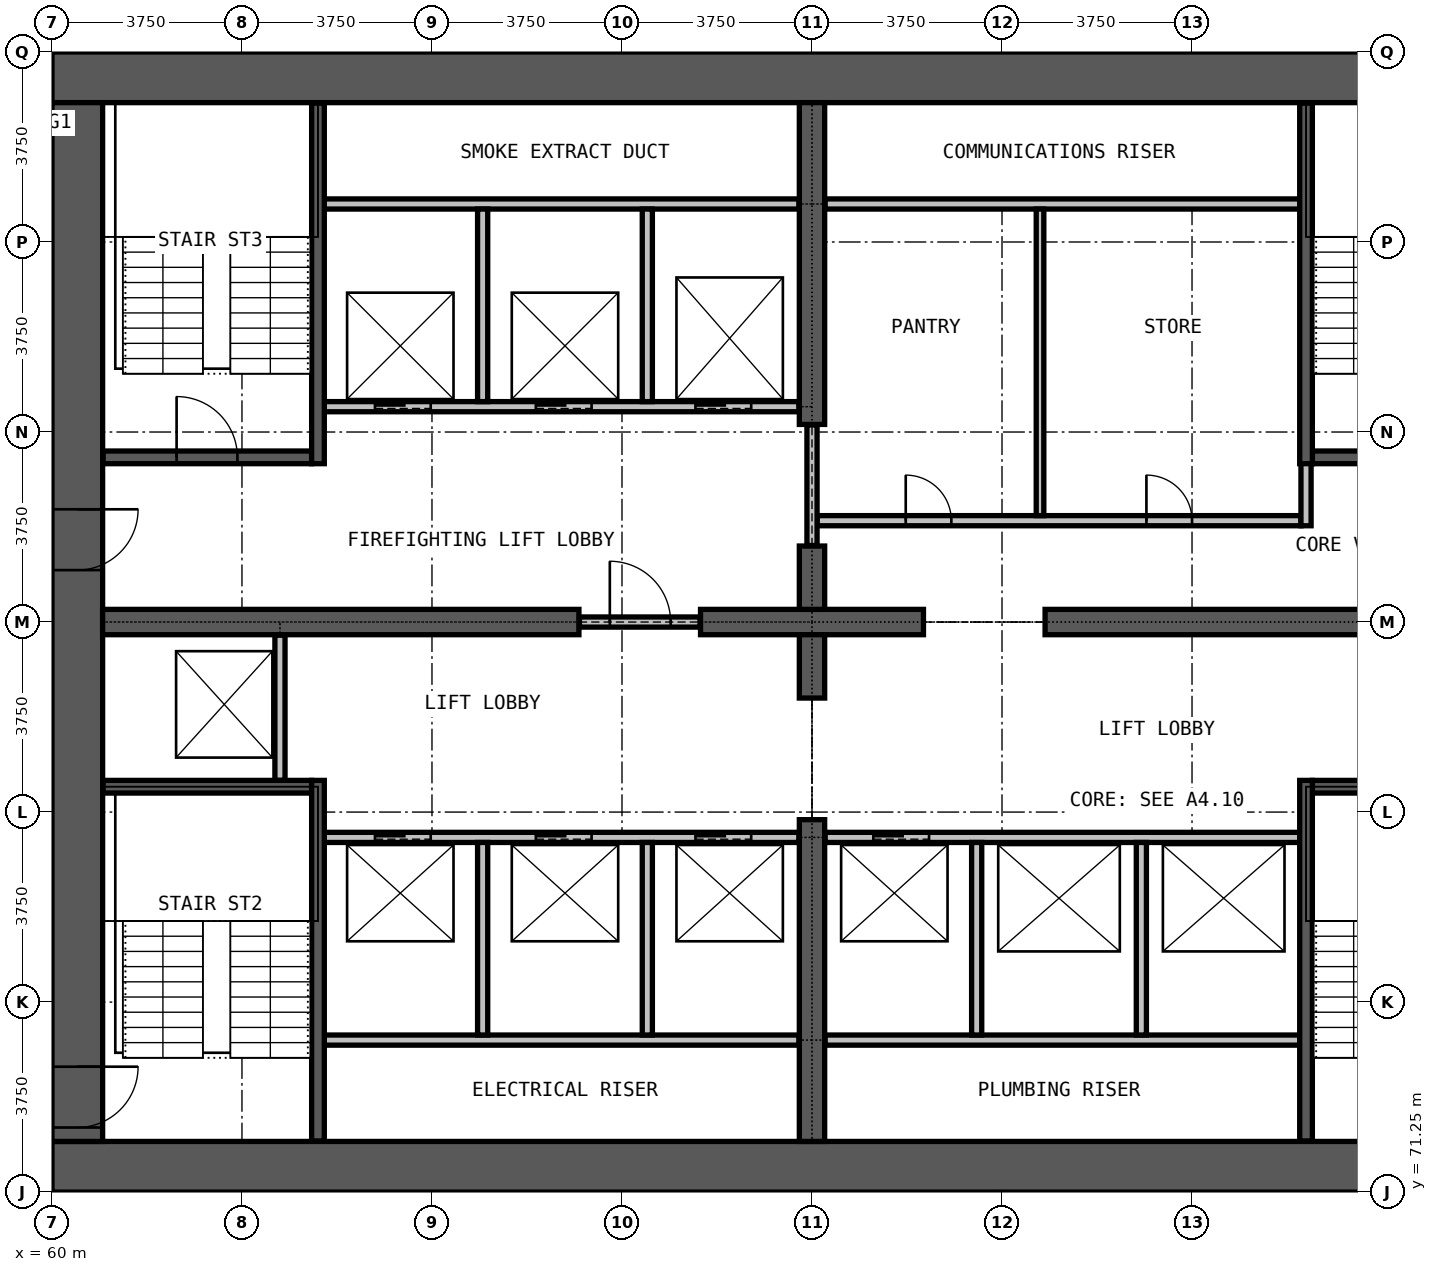
"""IFC4 building model, lengths in metres.
Left out: names, types, materials, properties, quantities, classifications, styles, units other than length and angle.
Written with IfcOpenShell. Run it as: python <this file> out.ifc"""

import sys

from ifc_helpers import new_model, si_unit, direction, frame, frame_2d, origin, place, context, subcontext, project, spatial, rectangle, extrude, element, fill, save


model = new_model("IFC4")
c1 = context("Model", 3, precision=1e-05, world=origin(), true_north=direction((0.0, 1.0)))
c2 = subcontext(c1, "Body", "Model", "MODEL_VIEW")
j1 = project(units=[si_unit("LENGTHUNIT", "METRE"), si_unit("PLANEANGLEUNIT", "RADIAN")], contexts=[c1])
p1 = place(None, origin())
s1 = spatial("IfcSite", under=j1, at=p1, CompositionType="ELEMENT")
p2 = place(p1, origin())
s2 = spatial("IfcBuilding", under=s1, at=p2, CompositionType="ELEMENT")
p3 = place(p2, frame((0.0, 0.0, 98.9)))
s3 = spatial("IfcBuildingStorey", under=s2, at=p3, CompositionType="ELEMENT", Elevation=98.9)
for number, where, z_axis, x_axis in (
    (1, (60.0, 71.75, 0.0), (0.0, 0.0, 1.0), (1.0, 0.0, 0.0)),
    (2, (90.0, 93.25, 0.0), (0.0, 0.0, 1.0), (-1.0, 0.0, 0.0)),
):
    element("IfcWall", number, at=place(p3, frame(where, z_axis=z_axis, x_axis=x_axis)), inside=s3, PredefinedType="SHEAR", context=c2, shape_type="SweptSolid", body=[
        extrude(rectangle(XDim=30.0, YDim=1.0, at=frame_2d((15.0, 0.0))), origin(), (0.0, 0.0, 1.0), 3.3),
    ])
p4 = place(p3, frame((60.5, 92.75, 0.0), z_axis=(0.0, 0.0, 1.0), x_axis=(0.0, -1.0, 0.0)))
e3 = element("IfcWall", 3, at=p4, inside=s3, PredefinedType="SHEAR", context=c2, shape_type="SweptSolid", body=[
    extrude(rectangle(XDim=20.5, YDim=1.0, at=frame_2d((10.25, 0.0))), origin(), (0.0, 0.0, 1.0), 3.3),
])
p5 = place(p4, frame((19.025, 0.0, 0.0)))
e4 = element("IfcOpeningElement", 4, at=p5, cuts=e3, PredefinedType="OPENING", context=c2, shape_type="SweptSolid", body=[
    extrude(rectangle(XDim=1.2, YDim=2.2, at=frame_2d((0.6, 1.1))), frame((0.0, 0.51, 0.0), z_axis=(0.0, -1.0, 0.0), x_axis=(1.0, 0.0, 0.0)), (0.0, 0.0, 1.0), 1.02),
])
p6 = place(p4, frame((8.025, 0.0, 0.0)))
e5 = element("IfcOpeningElement", 5, at=p6, cuts=e3, PredefinedType="OPENING", context=c2, shape_type="SweptSolid", body=[
    extrude(rectangle(XDim=1.2, YDim=2.2, at=frame_2d((0.6, 1.1))), frame((0.0, 0.51, 0.0), z_axis=(0.0, -1.0, 0.0), x_axis=(1.0, 0.0, 0.0)), (0.0, 0.0, 1.0), 1.02),
])
p7 = place(p3, frame((61.0, 82.5, 0.0), z_axis=(0.0, 0.0, 1.0), x_axis=(1.0, 0.0, 0.0)))
e6 = element("IfcWall", 6, at=p7, inside=s3, PredefinedType="SHEAR", context=c2, shape_type="SweptSolid", body=[
    extrude(rectangle(XDim=9.4, YDim=0.5, at=frame_2d((4.7, 0.0))), origin(), (0.0, 0.0, 1.0), 3.3),
])
p8 = place(p3, frame((72.8, 82.5, 0.0), z_axis=(0.0, 0.0, 1.0), x_axis=(1.0, 0.0, 0.0)))
e7 = element("IfcWall", 7, at=p8, inside=s3, PredefinedType="SHEAR", context=c2, shape_type="SweptSolid", body=[
    extrude(rectangle(XDim=4.4, YDim=0.5, at=frame_2d((2.2, 0.0))), origin(), (0.0, 0.0, 1.0), 3.3),
])
p9 = place(p3, frame((79.6, 82.5, 0.0), z_axis=(0.0, 0.0, 1.0), x_axis=(1.0, 0.0, 0.0)))
e8 = element("IfcWall", 8, at=p9, inside=s3, PredefinedType="SHEAR", context=c2, shape_type="SweptSolid", body=[
    extrude(rectangle(XDim=9.4, YDim=0.5, at=frame_2d((4.7, 0.0))), origin(), (0.0, 0.0, 1.0), 3.3),
])
p10 = place(p3, frame((75.0, 72.25, 0.0), z_axis=(0.0, 0.0, 1.0), x_axis=(0.0, 1.0, 0.0)))
e9 = element("IfcWall", 9, at=p10, inside=s3, PredefinedType="SHEAR", context=c2, shape_type="SweptSolid", body=[
    extrude(rectangle(XDim=6.35, YDim=0.5, at=frame_2d((3.175, 0.0))), origin(), (0.0, 0.0, 1.0), 3.3),
])
for number, where, z_axis, x_axis in (
    (10, (75.0, 81.0, 0.0), (0.0, 0.0, 1.0), (0.0, 1.0, 0.0)),
    (11, (75.0, 82.75, 0.0), (0.0, 0.0, 1.0), (0.0, 1.0, 0.0)),
):
    element("IfcWall", number, at=place(p3, frame(where, z_axis=z_axis, x_axis=x_axis)), inside=s3, PredefinedType="SHEAR", context=c2, shape_type="SweptSolid", body=[
        extrude(rectangle(XDim=1.25, YDim=0.5, at=frame_2d((0.625, 0.0))), origin(), (0.0, 0.0, 1.0), 3.3),
    ])
p11 = place(p3, frame((75.0, 86.4, 0.0), z_axis=(0.0, 0.0, 1.0), x_axis=(0.0, 1.0, 0.0)))
e12 = element("IfcWall", 12, at=p11, inside=s3, PredefinedType="SHEAR", context=c2, shape_type="SweptSolid", body=[
    extrude(rectangle(XDim=6.35, YDim=0.5, at=frame_2d((3.175, 0.0))), origin(), (0.0, 0.0, 1.0), 3.3),
])
p12 = place(p3, frame((70.41, 82.5, 0.0), z_axis=(0.0, 0.0, 1.0), x_axis=(1.0, 0.0, 0.0)))
e13 = element("IfcWall", 13, at=p12, inside=s3, PredefinedType="PARTITIONING", context=c2, shape_type="SweptSolid", body=[
    extrude(rectangle(XDim=2.38, YDim=0.2, at=frame_2d((1.19, 0.0))), origin(), (0.0, 0.0, 1.0), 2.4),
])
p13 = place(p12, frame((0.6, 0.0, 0.0)))
e14 = element("IfcOpeningElement", 14, at=p13, cuts=e13, PredefinedType="OPENING", context=c2, shape_type="SweptSolid", body=[
    extrude(rectangle(XDim=1.2, YDim=2.2, at=frame_2d((0.6, 1.1))), frame((0.0, 0.11, 0.0), z_axis=(0.0, -1.0, 0.0), x_axis=(1.0, 0.0, 0.0)), (0.0, 0.0, 1.0), 0.22),
])
p14 = place(p3, frame((75.1, 84.5, 0.0), z_axis=(0.0, 0.0, 1.0), x_axis=(1.0, 0.0, 0.0)))
e15 = element("IfcWall", 15, at=p14, inside=s3, PredefinedType="PARTITIONING", context=c2, shape_type="SweptSolid", body=[
    extrude(rectangle(XDim=9.55, YDim=0.2, at=frame_2d((4.775, 0.0))), origin(), (0.0, 0.0, 1.0), 2.95),
])
p15 = place(p14, frame((1.75, 0.0, 0.0)))
e16 = element("IfcOpeningElement", 16, at=p15, cuts=e15, PredefinedType="OPENING", context=c2, shape_type="SweptSolid", body=[
    extrude(rectangle(XDim=0.9, YDim=2.2, at=frame_2d((0.45, 1.1))), frame((0.0, 0.11, 0.0), z_axis=(0.0, -1.0, 0.0), x_axis=(1.0, 0.0, 0.0)), (0.0, 0.0, 1.0), 0.22),
])
p16 = place(p14, frame((6.5, 0.0, 0.0)))
e17 = element("IfcOpeningElement", 17, at=p16, cuts=e15, PredefinedType="OPENING", context=c2, shape_type="SweptSolid", body=[
    extrude(rectangle(XDim=0.9, YDim=2.2, at=frame_2d((0.45, 1.1))), frame((0.0, 0.11, 0.0), z_axis=(0.0, -1.0, 0.0), x_axis=(1.0, 0.0, 0.0)), (0.0, 0.0, 1.0), 0.22),
])
p17 = place(p3, frame((75.26, 90.75, 0.0), z_axis=(0.0, 0.0, 1.0), x_axis=(1.0, 0.0, 0.0)))
e18 = element("IfcWall", 18, at=p17, inside=s3, PredefinedType="PARTITIONING", context=c2, shape_type="SweptSolid", body=[
    extrude(rectangle(XDim=9.365, YDim=0.2, at=frame_2d((4.683, 0.0))), origin(), (0.0, 0.0, 1.0), 2.95),
])
p18 = place(p3, frame((75.0, 84.01, 0.0), z_axis=(0.0, 0.0, 1.0), x_axis=(0.0, 1.0, 0.0)))
e19 = element("IfcWall", 19, at=p18, inside=s3, PredefinedType="PARTITIONING", context=c2, shape_type="SweptSolid", body=[
    extrude(rectangle(XDim=2.38, YDim=0.2, at=frame_2d((1.19, 0.0))), origin(), (0.0, 0.0, 1.0), 2.4),
])
p19 = place(p3, frame((84.75, 84.4, 0.0), z_axis=(0.0, 0.0, 1.0), x_axis=(0.0, 1.0, 0.0)))
e20 = element("IfcWall", 20, at=p19, inside=s3, PredefinedType="PARTITIONING", context=c2, shape_type="SweptSolid", body=[
    extrude(rectangle(XDim=1.475, YDim=0.2, at=frame_2d((0.738, 0.0))), origin(), (0.0, 0.0, 1.0), 2.95),
])
p20 = place(p3, frame((79.5, 84.6, 0.0), z_axis=(0.0, 0.0, 1.0), x_axis=(0.0, 1.0, 0.0)))
e21 = element("IfcWall", 21, at=p20, inside=s3, PredefinedType="PARTITIONING", context=c2, shape_type="SweptSolid", body=[
    extrude(rectangle(XDim=6.05, YDim=0.15, at=frame_2d((3.025, 0.0))), origin(), (0.0, 0.0, 1.0), 2.95),
])
for number, where, z_axis, x_axis in (
    (22, (65.375, 74.25, 0.0), (0.0, 0.0, 1.0), (1.0, 0.0, 0.0)),
    (23, (75.26, 74.25, 0.0), (0.0, 0.0, 1.0), (1.0, 0.0, 0.0)),
):
    element("IfcWall", number, at=place(p3, frame(where, z_axis=z_axis, x_axis=x_axis)), inside=s3, PredefinedType="PARTITIONING", context=c2, shape_type="SweptSolid", body=[
        extrude(rectangle(XDim=9.365, YDim=0.2, at=frame_2d((4.683, 0.0))), origin(), (0.0, 0.0, 1.0), 2.95),
    ])
p21 = place(p3, frame((65.375, 78.25, 0.0), z_axis=(0.0, 0.0, 1.0), x_axis=(1.0, 0.0, 0.0)))
e24 = element("IfcWall", 24, at=p21, inside=s3, PredefinedType="PARTITIONING", context=c2, shape_type="SweptSolid", body=[
    extrude(rectangle(XDim=9.365, YDim=0.2, at=frame_2d((4.683, 0.0))), origin(), (0.0, 0.0, 1.0), 2.95),
])
p22 = place(p21, frame((1.0, 0.0, 0.0)))
e25 = element("IfcOpeningElement", 25, at=p22, cuts=e24, PredefinedType="OPENING", context=c2, shape_type="SweptSolid", body=[
    extrude(rectangle(XDim=1.1, YDim=2.2, at=frame_2d((0.55, 1.1))), frame((0.0, 0.11, 0.0), z_axis=(0.0, -1.0, 0.0), x_axis=(1.0, 0.0, 0.0)), (0.0, 0.0, 1.0), 0.22),
])
p23 = place(p21, frame((4.175, 0.0, 0.0)))
e26 = element("IfcOpeningElement", 26, at=p23, cuts=e24, PredefinedType="OPENING", context=c2, shape_type="SweptSolid", body=[
    extrude(rectangle(XDim=1.1, YDim=2.2, at=frame_2d((0.55, 1.1))), frame((0.0, 0.11, 0.0), z_axis=(0.0, -1.0, 0.0), x_axis=(1.0, 0.0, 0.0)), (0.0, 0.0, 1.0), 0.22),
])
p24 = place(p21, frame((7.325, 0.0, 0.0)))
e27 = element("IfcOpeningElement", 27, at=p24, cuts=e24, PredefinedType="OPENING", context=c2, shape_type="SweptSolid", body=[
    extrude(rectangle(XDim=1.1, YDim=2.2, at=frame_2d((0.55, 1.1))), frame((0.0, 0.11, 0.0), z_axis=(0.0, -1.0, 0.0), x_axis=(1.0, 0.0, 0.0)), (0.0, 0.0, 1.0), 0.22),
])
p25 = place(p3, frame((75.26, 78.25, 0.0), z_axis=(0.0, 0.0, 1.0), x_axis=(1.0, 0.0, 0.0)))
e28 = element("IfcWall", 28, at=p25, inside=s3, PredefinedType="PARTITIONING", context=c2, shape_type="SweptSolid", body=[
    extrude(rectangle(XDim=9.365, YDim=0.2, at=frame_2d((4.683, 0.0))), origin(), (0.0, 0.0, 1.0), 2.95),
])
p26 = place(p25, frame((0.95, 0.0, 0.0)))
e29 = element("IfcOpeningElement", 29, at=p26, cuts=e28, PredefinedType="OPENING", context=c2, shape_type="SweptSolid", body=[
    extrude(rectangle(XDim=1.1, YDim=2.2, at=frame_2d((0.55, 1.1))), frame((0.0, 0.11, 0.0), z_axis=(0.0, -1.0, 0.0), x_axis=(1.0, 0.0, 0.0)), (0.0, 0.0, 1.0), 0.22),
])
p27 = place(p3, frame((65.375, 86.75, 0.0), z_axis=(0.0, 0.0, 1.0), x_axis=(1.0, 0.0, 0.0)))
e30 = element("IfcWall", 30, at=p27, inside=s3, PredefinedType="PARTITIONING", context=c2, shape_type="SweptSolid", body=[
    extrude(rectangle(XDim=9.365, YDim=0.2, at=frame_2d((4.683, 0.0))), origin(), (0.0, 0.0, 1.0), 2.95),
])
p28 = place(p27, frame((1.0, 0.0, 0.0)))
e31 = element("IfcOpeningElement", 31, at=p28, cuts=e30, PredefinedType="OPENING", context=c2, shape_type="SweptSolid", body=[
    extrude(rectangle(XDim=1.1, YDim=2.2, at=frame_2d((0.55, 1.1))), frame((0.0, 0.11, 0.0), z_axis=(0.0, -1.0, 0.0), x_axis=(1.0, 0.0, 0.0)), (0.0, 0.0, 1.0), 0.22),
])
p29 = place(p27, frame((4.175, 0.0, 0.0)))
e32 = element("IfcOpeningElement", 32, at=p29, cuts=e30, PredefinedType="OPENING", context=c2, shape_type="SweptSolid", body=[
    extrude(rectangle(XDim=1.1, YDim=2.2, at=frame_2d((0.55, 1.1))), frame((0.0, 0.11, 0.0), z_axis=(0.0, -1.0, 0.0), x_axis=(1.0, 0.0, 0.0)), (0.0, 0.0, 1.0), 0.22),
])
p30 = place(p27, frame((7.325, 0.0, 0.0)))
e33 = element("IfcOpeningElement", 33, at=p30, cuts=e30, PredefinedType="OPENING", context=c2, shape_type="SweptSolid", body=[
    extrude(rectangle(XDim=1.1, YDim=2.2, at=frame_2d((0.55, 1.1))), frame((0.0, 0.11, 0.0), z_axis=(0.0, -1.0, 0.0), x_axis=(1.0, 0.0, 0.0)), (0.0, 0.0, 1.0), 0.22),
])
p31 = place(p3, frame((65.375, 90.75, 0.0), z_axis=(0.0, 0.0, 1.0), x_axis=(1.0, 0.0, 0.0)))
e34 = element("IfcWall", 34, at=p31, inside=s3, PredefinedType="PARTITIONING", context=c2, shape_type="SweptSolid", body=[
    extrude(rectangle(XDim=9.365, YDim=0.2, at=frame_2d((4.683, 0.0))), origin(), (0.0, 0.0, 1.0), 2.95),
])
p32 = place(p3, frame((64.5, 79.375, 0.0), z_axis=(0.0, 0.0, 1.0), x_axis=(0.0, 1.0, 0.0)))
e35 = element("IfcWall", 35, at=p32, inside=s3, PredefinedType="PARTITIONING", context=c2, shape_type="SweptSolid", body=[
    extrude(rectangle(XDim=2.865, YDim=0.2, at=frame_2d((1.433, 0.0))), origin(), (0.0, 0.0, 1.0), 2.95),
])
for number, where, z_axis, x_axis in (
    (36, (68.5, 74.35, 0.0), (0.0, 0.0, 1.0), (0.0, 1.0, 0.0)),
    (37, (68.5, 86.85, 0.0), (0.0, 0.0, 1.0), (0.0, 1.0, 0.0)),
    (38, (71.75, 74.35, 0.0), (0.0, 0.0, 1.0), (0.0, 1.0, 0.0)),
    (39, (71.75, 86.85, 0.0), (0.0, 0.0, 1.0), (0.0, 1.0, 0.0)),
    (40, (78.25, 74.35, 0.0), (0.0, 0.0, 1.0), (0.0, 1.0, 0.0)),
    (41, (81.5, 74.35, 0.0), (0.0, 0.0, 1.0), (0.0, 1.0, 0.0)),
):
    element("IfcWall", number, at=place(p3, frame(where, z_axis=z_axis, x_axis=x_axis)), inside=s3, PredefinedType="PARTITIONING", context=c2, shape_type="SweptSolid", body=[
        extrude(rectangle(XDim=3.8, YDim=0.2, at=frame_2d((1.9, 0.0))), origin(), (0.0, 0.0, 1.0), 2.95),
    ])
for number, where, z_axis, x_axis in (
    (42, (61.01, 79.25, 0.0), (0.0, 0.0, 1.0), (1.0, 0.0, 0.0)),
    (43, (84.875, 79.25, 0.0), (0.0, 0.0, 1.0), (1.0, 0.0, 0.0)),
):
    element("IfcWall", number, at=place(p3, frame(where, z_axis=z_axis, x_axis=x_axis)), inside=s3, PredefinedType="PARTITIONING", context=c2, shape_type="SweptSolid", body=[
        extrude(rectangle(XDim=4.115, YDim=0.25, at=frame_2d((2.058, 0.0))), origin(), (0.0, 0.0, 1.0), 2.95),
    ])
p33 = place(p3, frame((61.01, 85.75, 0.0), z_axis=(0.0, 0.0, 1.0), x_axis=(1.0, 0.0, 0.0)))
e44 = element("IfcWall", 44, at=p33, inside=s3, PredefinedType="PARTITIONING", context=c2, shape_type="SweptSolid", body=[
    extrude(rectangle(XDim=4.115, YDim=0.25, at=frame_2d((2.058, 0.0))), origin(), (0.0, 0.0, 1.0), 2.95),
])
p34 = place(p33, frame((1.45, 0.0, 0.0)))
e45 = element("IfcOpeningElement", 45, at=p34, cuts=e44, PredefinedType="OPENING", context=c2, shape_type="SweptSolid", body=[
    extrude(rectangle(XDim=1.2, YDim=2.2, at=frame_2d((0.6, 1.1))), frame((0.0, 0.135, 0.0), z_axis=(0.0, -1.0, 0.0), x_axis=(1.0, 0.0, 0.0)), (0.0, 0.0, 1.0), 0.27),
])
p35 = place(p3, frame((84.875, 85.75, 0.0), z_axis=(0.0, 0.0, 1.0), x_axis=(1.0, 0.0, 0.0)))
e46 = element("IfcWall", 46, at=p35, inside=s3, PredefinedType="PARTITIONING", context=c2, shape_type="SweptSolid", body=[
    extrude(rectangle(XDim=4.115, YDim=0.25, at=frame_2d((2.058, 0.0))), origin(), (0.0, 0.0, 1.0), 2.95),
])
for number, where, z_axis, x_axis in (
    (47, (65.25, 72.26, 0.0), (0.0, 0.0, 1.0), (0.0, 1.0, 0.0)),
    (48, (65.25, 85.625, 0.0), (0.0, 0.0, 1.0), (0.0, 1.0, 0.0)),
    (49, (84.75, 72.26, 0.0), (0.0, 0.0, 1.0), (0.0, 1.0, 0.0)),
    (50, (84.75, 85.625, 0.0), (0.0, 0.0, 1.0), (0.0, 1.0, 0.0)),
):
    element("IfcWall", number, at=place(p3, frame(where, z_axis=z_axis, x_axis=x_axis)), inside=s3, PredefinedType="PARTITIONING", context=c2, shape_type="SweptSolid", body=[
        extrude(rectangle(XDim=7.115, YDim=0.25, at=frame_2d((3.558, 0.0))), origin(), (0.0, 0.0, 1.0), 2.95),
    ])
p36 = place(p22, origin())
e51 = element("IfcDoor", 51, at=p36, inside=s3, OperationType="DOUBLE_DOOR_SLIDING", PredefinedType="DOOR", context=c2, shape_type="SweptSolid", body=[
    extrude(rectangle(XDim=1.1, YDim=2.2, at=frame_2d((0.55, 1.1))), frame((0.0, 0.025, 0.0), z_axis=(0.0, -1.0, 0.0), x_axis=(1.0, 0.0, 0.0)), (0.0, 0.0, 1.0), 0.05),
])
fill(e25, e51)
p37 = place(p23, origin())
e52 = element("IfcDoor", 52, at=p37, inside=s3, OperationType="DOUBLE_DOOR_SLIDING", PredefinedType="DOOR", context=c2, shape_type="SweptSolid", body=[
    extrude(rectangle(XDim=1.1, YDim=2.2, at=frame_2d((0.55, 1.1))), frame((0.0, 0.025, 0.0), z_axis=(0.0, -1.0, 0.0), x_axis=(1.0, 0.0, 0.0)), (0.0, 0.0, 1.0), 0.05),
])
fill(e26, e52)
p38 = place(p24, origin())
e53 = element("IfcDoor", 53, at=p38, inside=s3, OperationType="DOUBLE_DOOR_SLIDING", PredefinedType="DOOR", context=c2, shape_type="SweptSolid", body=[
    extrude(rectangle(XDim=1.1, YDim=2.2, at=frame_2d((0.55, 1.1))), frame((0.0, 0.025, 0.0), z_axis=(0.0, -1.0, 0.0), x_axis=(1.0, 0.0, 0.0)), (0.0, 0.0, 1.0), 0.05),
])
fill(e27, e53)
p39 = place(p26, origin())
e54 = element("IfcDoor", 54, at=p39, inside=s3, OperationType="DOUBLE_DOOR_SLIDING", PredefinedType="DOOR", context=c2, shape_type="SweptSolid", body=[
    extrude(rectangle(XDim=1.1, YDim=2.2, at=frame_2d((0.55, 1.1))), frame((0.0, 0.025, 0.0), z_axis=(0.0, -1.0, 0.0), x_axis=(1.0, 0.0, 0.0)), (0.0, 0.0, 1.0), 0.05),
])
fill(e29, e54)
p40 = place(p28, origin())
e55 = element("IfcDoor", 55, at=p40, inside=s3, OperationType="DOUBLE_DOOR_SLIDING", PredefinedType="DOOR", context=c2, shape_type="SweptSolid", body=[
    extrude(rectangle(XDim=1.1, YDim=2.2, at=frame_2d((0.55, 1.1))), frame((0.0, 0.025, 0.0), z_axis=(0.0, -1.0, 0.0), x_axis=(1.0, 0.0, 0.0)), (0.0, 0.0, 1.0), 0.05),
])
fill(e31, e55)
p41 = place(p29, origin())
e56 = element("IfcDoor", 56, at=p41, inside=s3, OperationType="DOUBLE_DOOR_SLIDING", PredefinedType="DOOR", context=c2, shape_type="SweptSolid", body=[
    extrude(rectangle(XDim=1.1, YDim=2.2, at=frame_2d((0.55, 1.1))), frame((0.0, 0.025, 0.0), z_axis=(0.0, -1.0, 0.0), x_axis=(1.0, 0.0, 0.0)), (0.0, 0.0, 1.0), 0.05),
])
fill(e32, e56)
p42 = place(p30, origin())
e57 = element("IfcDoor", 57, at=p42, inside=s3, OperationType="DOUBLE_DOOR_SLIDING", PredefinedType="DOOR", context=c2, shape_type="SweptSolid", body=[
    extrude(rectangle(XDim=1.1, YDim=2.2, at=frame_2d((0.55, 1.1))), frame((0.0, 0.025, 0.0), z_axis=(0.0, -1.0, 0.0), x_axis=(1.0, 0.0, 0.0)), (0.0, 0.0, 1.0), 0.05),
])
fill(e33, e57)
p43 = place(p13, origin())
e58 = element("IfcDoor", 58, at=p43, inside=s3, OperationType="SINGLE_SWING_RIGHT", PredefinedType="DOOR", context=c2, shape_type="SweptSolid", body=[
    extrude(rectangle(XDim=1.2, YDim=2.2, at=frame_2d((0.6, 1.1))), frame((0.0, 0.025, 0.0), z_axis=(0.0, -1.0, 0.0), x_axis=(1.0, 0.0, 0.0)), (0.0, 0.0, 1.0), 0.05),
])
fill(e14, e58)
p44 = place(p34, origin())
e59 = element("IfcDoor", 59, at=p44, inside=s3, OperationType="SINGLE_SWING_LEFT", PredefinedType="DOOR", context=c2, shape_type="SweptSolid", body=[
    extrude(rectangle(XDim=1.2, YDim=2.2, at=frame_2d((0.6, 1.1))), frame((0.0, 0.025, 0.0), z_axis=(0.0, -1.0, 0.0), x_axis=(1.0, 0.0, 0.0)), (0.0, 0.0, 1.0), 0.05),
])
fill(e45, e59)
p45 = place(p5, origin())
e60 = element("IfcDoor", 60, at=p45, inside=s3, OperationType="SINGLE_SWING_LEFT", PredefinedType="DOOR", context=c2, shape_type="SweptSolid", body=[
    extrude(rectangle(XDim=1.2, YDim=2.2, at=frame_2d((0.6, 1.1))), frame((0.0, 0.025, 0.0), z_axis=(0.0, -1.0, 0.0), x_axis=(1.0, 0.0, 0.0)), (0.0, 0.0, 1.0), 0.05),
])
fill(e4, e60)
p46 = place(p6, origin())
e61 = element("IfcDoor", 61, at=p46, inside=s3, OperationType="SINGLE_SWING_LEFT", PredefinedType="DOOR", context=c2, shape_type="SweptSolid", body=[
    extrude(rectangle(XDim=1.2, YDim=2.2, at=frame_2d((0.6, 1.1))), frame((0.0, 0.025, 0.0), z_axis=(0.0, -1.0, 0.0), x_axis=(1.0, 0.0, 0.0)), (0.0, 0.0, 1.0), 0.05),
])
fill(e5, e61)
p47 = place(p15, origin())
e62 = element("IfcDoor", 62, at=p47, inside=s3, OperationType="SINGLE_SWING_LEFT", PredefinedType="DOOR", context=c2, shape_type="SweptSolid", body=[
    extrude(rectangle(XDim=0.9, YDim=2.2, at=frame_2d((0.45, 1.1))), frame((0.0, 0.025, 0.0), z_axis=(0.0, -1.0, 0.0), x_axis=(1.0, 0.0, 0.0)), (0.0, 0.0, 1.0), 0.05),
])
fill(e16, e62)
p48 = place(p16, origin())
e63 = element("IfcDoor", 63, at=p48, inside=s3, OperationType="SINGLE_SWING_LEFT", PredefinedType="DOOR", context=c2, shape_type="SweptSolid", body=[
    extrude(rectangle(XDim=0.9, YDim=2.2, at=frame_2d((0.45, 1.1))), frame((0.0, 0.025, 0.0), z_axis=(0.0, -1.0, 0.0), x_axis=(1.0, 0.0, 0.0)), (0.0, 0.0, 1.0), 0.05),
])
fill(e17, e63)
save(model, sys.argv[1])
